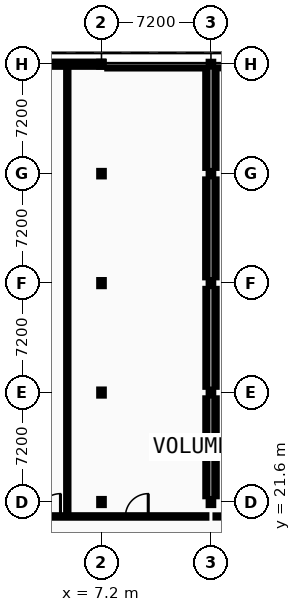
"""IFC4 building model, lengths in metres.
Left out: names, types, materials, properties, quantities, classifications, styles, units other than length and angle.
Written with IfcOpenShell. Run it as: python <this file> out.ifc"""

import sys

from ifc_helpers import new_model, si_unit, direction, frame, frame_2d, origin, origin_2d, place, context, subcontext, project, spatial, rectangle, i_section, extrude, element, fill, save


model = new_model("IFC4")
c1 = context("Model", 3, precision=1e-05, world=origin(), true_north=direction((0.0, 1.0)))
c2 = subcontext(c1, "Body", "Model", "MODEL_VIEW")
j1 = project(units=[si_unit("LENGTHUNIT", "METRE"), si_unit("PLANEANGLEUNIT", "RADIAN")], contexts=[c1])
p1 = place(None, origin())
s1 = spatial("IfcSite", under=j1, at=p1, CompositionType="ELEMENT")
p2 = place(p1, origin())
s2 = spatial("IfcBuilding", under=s1, at=p2, CompositionType="ELEMENT")
p3 = place(p2, frame((0.0, 0.0, 14.0)))
s3 = spatial("IfcBuildingStorey", under=s2, at=p3, CompositionType="ELEMENT", Elevation=14.0)
for number, where, z_axis, x_axis in (
    (1, (7.2, 21.6, 0.0), (0.0, 0.0, 1.0), (1.0, 0.0, 0.0)),
    (2, (7.2, 28.8, 0.0), (0.0, 0.0, 1.0), (1.0, 0.0, 0.0)),
    (3, (7.2, 36.0, 0.0), (0.0, 0.0, 1.0), (1.0, 0.0, 0.0)),
):
    element("IfcColumn", number, at=place(p3, frame(where, z_axis=z_axis, x_axis=x_axis)), inside=s3, PredefinedType="COLUMN", context=c2, shape_type="SweptSolid", body=[
        extrude(i_section(OverallWidth=0.3, OverallDepth=0.4, WebThickness=0.013, FlangeThickness=0.024, FilletRadius=0.027, at=origin_2d()), origin(), (0.0, 0.0, 1.0), 4.4),
    ])
p4 = place(p3, frame((7.2, 43.2, 0.0), z_axis=(0.0, 0.0, 1.0), x_axis=(1.0, 0.0, 0.0)))
e4 = element("IfcColumn", 4, at=p4, inside=s3, PredefinedType="COLUMN", context=c2, shape_type="SweptSolid", body=[
    extrude(i_section(OverallWidth=0.3, OverallDepth=0.36, WebThickness=0.012, FlangeThickness=0.022, FilletRadius=0.027, at=origin_2d()), origin(), (0.0, 0.0, 1.0), 4.4),
])
p5 = place(p3, frame((7.2, 50.4, 0.0), z_axis=(0.0, 0.0, 1.0), x_axis=(1.0, 0.0, 0.0)))
e5 = element("IfcColumn", 5, at=p5, inside=s3, PredefinedType="COLUMN", context=c2, shape_type="SweptSolid", body=[
    extrude(i_section(OverallWidth=0.3, OverallDepth=0.32, WebThickness=0.011, FlangeThickness=0.021, FilletRadius=0.027, at=origin_2d()), origin(), (0.0, 0.0, 1.0), 4.4),
])
for number, where, z_axis, x_axis in (
    (6, (14.4, 21.6, 0.0), (0.0, 0.0, 1.0), (1.0, 0.0, 0.0)),
    (7, (14.4, 28.8, 0.0), (0.0, 0.0, 1.0), (1.0, 0.0, 0.0)),
    (8, (14.4, 36.0, 0.0), (0.0, 0.0, 1.0), (1.0, 0.0, 0.0)),
):
    element("IfcColumn", number, at=place(p3, frame(where, z_axis=z_axis, x_axis=x_axis)), inside=s3, PredefinedType="COLUMN", context=c2, shape_type="SweptSolid", body=[
        extrude(i_section(OverallWidth=0.3, OverallDepth=0.4, WebThickness=0.013, FlangeThickness=0.024, FilletRadius=0.027, at=origin_2d()), origin(), (0.0, 0.0, 1.0), 4.4),
    ])
p6 = place(p3, frame((14.4, 43.2, 0.0), z_axis=(0.0, 0.0, 1.0), x_axis=(1.0, 0.0, 0.0)))
e9 = element("IfcColumn", 9, at=p6, inside=s3, PredefinedType="COLUMN", context=c2, shape_type="SweptSolid", body=[
    extrude(i_section(OverallWidth=0.3, OverallDepth=0.36, WebThickness=0.012, FlangeThickness=0.022, FilletRadius=0.027, at=origin_2d()), origin(), (0.0, 0.0, 1.0), 4.4),
])
p7 = place(p3, frame((14.4, 50.4, 0.0), z_axis=(0.0, 0.0, 1.0), x_axis=(1.0, 0.0, 0.0)))
e10 = element("IfcColumn", 10, at=p7, inside=s3, PredefinedType="COLUMN", context=c2, shape_type="SweptSolid", body=[
    extrude(i_section(OverallWidth=0.3, OverallDepth=0.32, WebThickness=0.011, FlangeThickness=0.021, FilletRadius=0.027, at=origin_2d()), origin(), (0.0, 0.0, 1.0), 4.4),
])
p8 = place(p3, frame((7.31, 50.4, 0.0), z_axis=(0.0, 0.0, 1.0), x_axis=(-1.0, 0.0, 0.0)))
e11 = element("IfcWall", 11, at=p8, inside=s3, PredefinedType="STANDARD", context=c2, shape_type="SweptSolid", body=[
    extrude(rectangle(XDim=7.48, YDim=0.34, at=frame_2d((3.74, 0.0))), origin(), (0.0, 0.0, 1.0), 3.935),
])
p9 = place(p8, frame((4.619, 0.0, 0.95)))
e12 = element("IfcOpeningElement", 12, at=p9, cuts=e11, PredefinedType="OPENING", context=c2, shape_type="SweptSolid", body=[
    extrude(rectangle(XDim=1.234, YDim=1.332, at=frame_2d((0.617, 0.666))), frame((0.0, 0.18, 0.0), z_axis=(0.0, -1.0, 0.0), x_axis=(1.0, 0.0, 0.0)), (0.0, 0.0, 1.0), 0.36),
])
p10 = place(p3, frame((0.2, 20.65, 0.0), z_axis=(0.0, 0.0, 1.0), x_axis=(1.0, 0.0, 0.0)))
e13 = element("IfcWall", 13, at=p10, inside=s3, PredefinedType="PARTITIONING", context=c2, shape_type="SweptSolid", body=[
    extrude(rectangle(XDim=13.9, YDim=0.16, at=frame_2d((6.95, 0.0))), origin(), (0.0, 0.0, 1.0), 4.2),
])
p11 = place(p10, frame((2.8, 0.0, 0.0)))
e14 = element("IfcOpeningElement", 14, at=p11, cuts=e13, PredefinedType="OPENING", context=c2, shape_type="SweptSolid", body=[
    extrude(rectangle(XDim=1.5, YDim=2.2, at=frame_2d((0.75, 1.1))), frame((0.0, 0.09, 0.0), z_axis=(0.0, -1.0, 0.0), x_axis=(1.0, 0.0, 0.0)), (0.0, 0.0, 1.0), 0.18),
])
p12 = place(p10, frame((8.575, 0.0, 0.0)))
e15 = element("IfcOpeningElement", 15, at=p12, cuts=e13, PredefinedType="OPENING", context=c2, shape_type="SweptSolid", body=[
    extrude(rectangle(XDim=1.5, YDim=2.2, at=frame_2d((0.75, 1.1))), frame((0.0, 0.09, 0.0), z_axis=(0.0, -1.0, 0.0), x_axis=(1.0, 0.0, 0.0)), (0.0, 0.0, 1.0), 0.18),
])
p13 = place(p3, frame((14.7, 20.65, 0.0), z_axis=(0.0, 0.0, 1.0), x_axis=(1.0, 0.0, 0.0)))
e16 = element("IfcWall", 16, at=p13, inside=s3, PredefinedType="PARTITIONING", context=c2, shape_type="SweptSolid", body=[
    extrude(rectangle(XDim=13.9, YDim=0.142, at=frame_2d((6.95, 0.0))), origin(), (0.0, 0.0, 1.0), 4.2),
])
p14 = place(p13, frame((2.384, 0.0, 0.0)))
e17 = element("IfcOpeningElement", 17, at=p14, cuts=e16, PredefinedType="OPENING", context=c2, shape_type="SweptSolid", body=[
    extrude(rectangle(XDim=0.932, YDim=2.04, at=frame_2d((0.466, 1.02))), frame((0.0, 0.081, 0.0), z_axis=(0.0, -1.0, 0.0), x_axis=(1.0, 0.0, 0.0)), (0.0, 0.0, 1.0), 0.162),
])
p15 = place(p13, frame((9.05, 0.0, 0.0)))
e18 = element("IfcOpeningElement", 18, at=p15, cuts=e16, PredefinedType="OPENING", context=c2, shape_type="SweptSolid", body=[
    extrude(rectangle(XDim=1.5, YDim=2.2, at=frame_2d((0.75, 1.1))), frame((0.0, 0.081, 0.0), z_axis=(0.0, -1.0, 0.0), x_axis=(1.0, 0.0, 0.0)), (0.0, 0.0, 1.0), 0.162),
])
p16 = place(p3, frame((7.58, 50.2, 0.0), z_axis=(0.0, 0.0, 1.0), x_axis=(1.0, 0.0, 0.0)))
e19 = element("IfcWall", 19, at=p16, inside=s3, PredefinedType="PARTITIONING", context=c2, shape_type="SweptSolid", body=[
    extrude(rectangle(XDim=6.44, YDim=0.16, at=frame_2d((3.22, 0.0))), origin(), (0.0, 0.0, 1.0), 3.935),
])
p17 = place(p3, frame((14.78, 50.2, 0.0), z_axis=(0.0, 0.0, 1.0), x_axis=(1.0, 0.0, 0.0)))
e20 = element("IfcWall", 20, at=p17, inside=s3, PredefinedType="PARTITIONING", context=c2, shape_type="SweptSolid", body=[
    extrude(rectangle(XDim=6.44, YDim=0.142, at=frame_2d((3.22, 0.0))), origin(), (0.0, 0.0, 1.0), 3.935),
])
p18 = place(p3, frame((4.95, 20.73, 0.0), z_axis=(0.0, 0.0, 1.0), x_axis=(0.0, 1.0, 0.0)))
e21 = element("IfcWall", 21, at=p18, inside=s3, PredefinedType="PARTITIONING", context=c2, shape_type="SweptSolid", body=[
    extrude(rectangle(XDim=29.47, YDim=0.15, at=frame_2d((14.735, 0.0))), origin(), (0.0, 0.0, 1.0), 3.945),
])
p19 = place(p3, frame((14.1, 21.98, 0.0), z_axis=(0.0, 0.0, 1.0), x_axis=(0.0, 1.0, 0.0)))
e22 = element("IfcWall", 22, at=p19, inside=s3, PredefinedType="PARTITIONING", context=c2, shape_type="SweptSolid", body=[
    extrude(rectangle(XDim=6.44, YDim=0.142, at=frame_2d((3.22, 0.0))), origin(), (0.0, 0.0, 1.0), 3.895),
])
p20 = place(p3, frame((14.1, 29.18, 0.0), z_axis=(0.0, 0.0, 1.0), x_axis=(0.0, 1.0, 0.0)))
e23 = element("IfcWall", 23, at=p20, inside=s3, PredefinedType="PARTITIONING", context=c2, shape_type="SweptSolid", body=[
    extrude(rectangle(XDim=6.44, YDim=0.135, at=frame_2d((3.22, 0.0))), origin(), (0.0, 0.0, 1.0), 4.2),
])
p21 = place(p3, frame((14.1, 36.38, 0.0), z_axis=(0.0, 0.0, 1.0), x_axis=(0.0, 1.0, 0.0)))
e24 = element("IfcWall", 24, at=p21, inside=s3, PredefinedType="PARTITIONING", context=c2, shape_type="SweptSolid", body=[
    extrude(rectangle(XDim=6.44, YDim=0.16, at=frame_2d((3.22, 0.0))), origin(), (0.0, 0.0, 1.0), 3.895),
])
p22 = place(p3, frame((14.1, 43.58, 0.0), z_axis=(0.0, 0.0, 1.0), x_axis=(0.0, 1.0, 0.0)))
e25 = element("IfcWall", 25, at=p22, inside=s3, PredefinedType="PARTITIONING", context=c2, shape_type="SweptSolid", body=[
    extrude(rectangle(XDim=6.44, YDim=0.15, at=frame_2d((3.22, 0.0))), origin(), (0.0, 0.0, 1.0), 3.895),
])
p23 = place(p3, frame((14.7, 21.98, 0.0), z_axis=(0.0, 0.0, 1.0), x_axis=(0.0, 1.0, 0.0)))
e26 = element("IfcWall", 26, at=p23, inside=s3, PredefinedType="PARTITIONING", context=c2, shape_type="SweptSolid", body=[
    extrude(rectangle(XDim=6.44, YDim=0.16, at=frame_2d((3.22, 0.0))), origin(), (0.0, 0.0, 1.0), 3.895),
])
p24 = place(p3, frame((14.7, 29.18, 0.0), z_axis=(0.0, 0.0, 1.0), x_axis=(0.0, 1.0, 0.0)))
e27 = element("IfcWall", 27, at=p24, inside=s3, PredefinedType="PARTITIONING", context=c2, shape_type="SweptSolid", body=[
    extrude(rectangle(XDim=6.44, YDim=0.15, at=frame_2d((3.22, 0.0))), origin(), (0.0, 0.0, 1.0), 3.895),
])
p25 = place(p3, frame((14.7, 36.38, 0.0), z_axis=(0.0, 0.0, 1.0), x_axis=(0.0, 1.0, 0.0)))
e28 = element("IfcWall", 28, at=p25, inside=s3, PredefinedType="PARTITIONING", context=c2, shape_type="SweptSolid", body=[
    extrude(rectangle(XDim=6.44, YDim=0.142, at=frame_2d((3.22, 0.0))), origin(), (0.0, 0.0, 1.0), 3.895),
])
p26 = place(p3, frame((14.7, 43.58, 0.0), z_axis=(0.0, 0.0, 1.0), x_axis=(0.0, 1.0, 0.0)))
e29 = element("IfcWall", 29, at=p26, inside=s3, PredefinedType="PARTITIONING", context=c2, shape_type="SweptSolid", body=[
    extrude(rectangle(XDim=6.44, YDim=0.135, at=frame_2d((3.22, 0.0))), origin(), (0.0, 0.0, 1.0), 4.2),
])
p27 = place(p11, frame((1.5, 0.0, 0.0), z_axis=(0.0, 0.0, 1.0), x_axis=(-1.0, 0.0, 0.0)))
e30 = element("IfcDoor", 30, at=p27, inside=s3, OperationType="DOUBLE_DOOR_SINGLE_SWING", PredefinedType="DOOR", context=c2, shape_type="SweptSolid", body=[
    extrude(rectangle(XDim=1.5, YDim=2.2, at=frame_2d((0.75, 1.1))), frame((0.0, 0.025, 0.0), z_axis=(0.0, -1.0, 0.0), x_axis=(1.0, 0.0, 0.0)), (0.0, 0.0, 1.0), 0.05),
])
fill(e14, e30)
p28 = place(p12, frame((1.5, 0.0, 0.0), z_axis=(0.0, 0.0, 1.0), x_axis=(-1.0, 0.0, 0.0)))
e31 = element("IfcDoor", 31, at=p28, inside=s3, OperationType="DOUBLE_DOOR_SINGLE_SWING", PredefinedType="DOOR", context=c2, shape_type="SweptSolid", body=[
    extrude(rectangle(XDim=1.5, YDim=2.2, at=frame_2d((0.75, 1.1))), frame((0.0, 0.025, 0.0), z_axis=(0.0, -1.0, 0.0), x_axis=(1.0, 0.0, 0.0)), (0.0, 0.0, 1.0), 0.05),
])
fill(e15, e31)
save(model, sys.argv[1])
